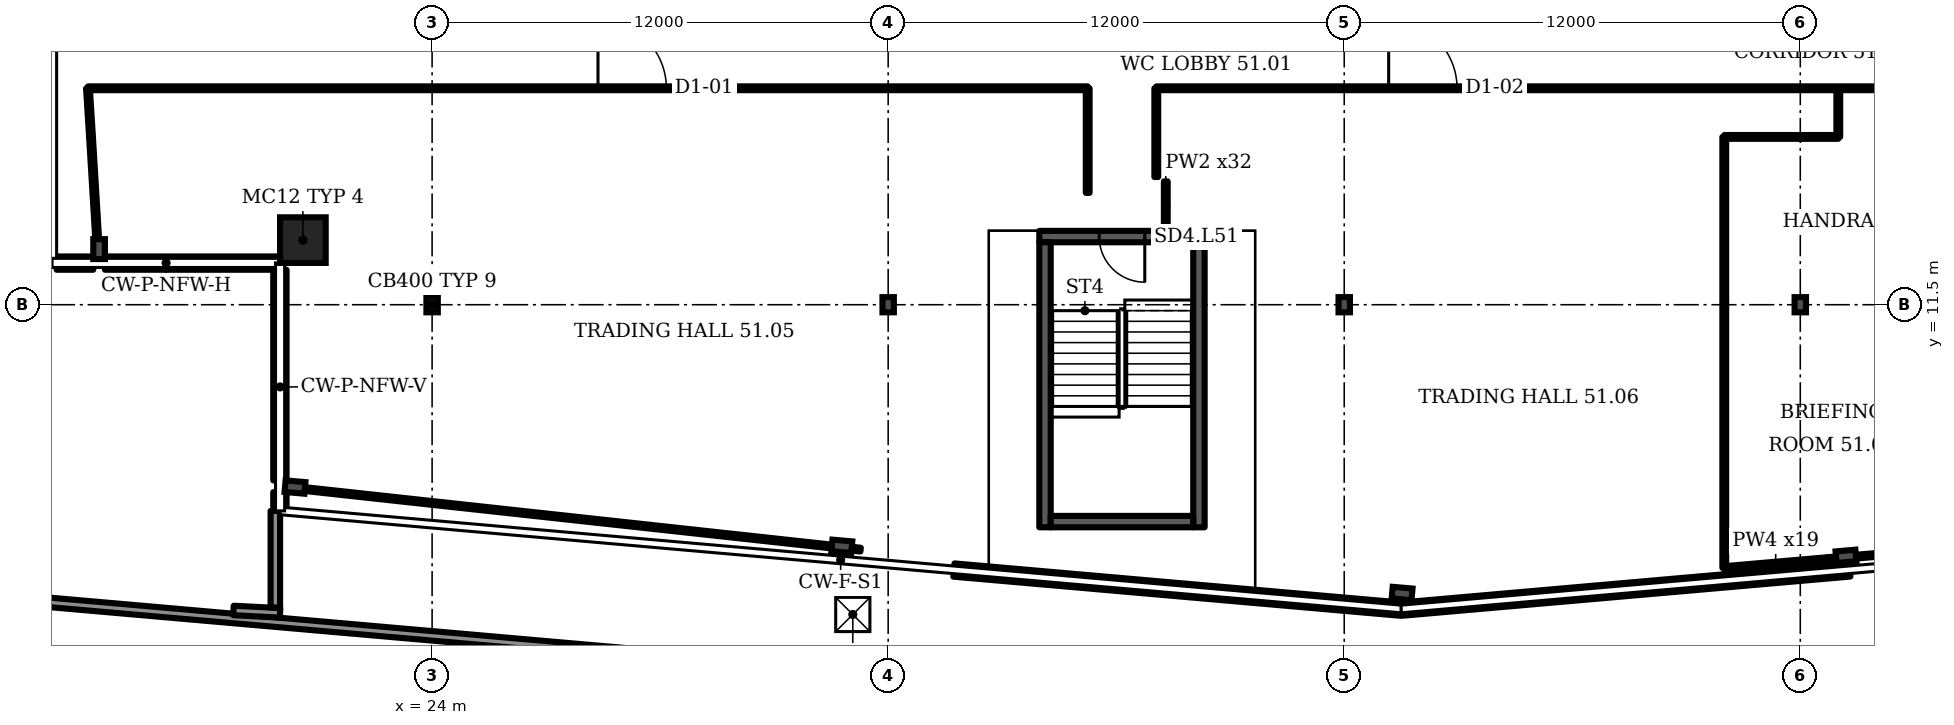
"""IFC4 building model, lengths in metres.
Left out: names, types, materials, properties, quantities, classifications, styles, units other than length and angle.
Written with IfcOpenShell. Run it as: python <this file> out.ifc"""

import sys

from ifc_helpers import new_model, si_unit, direction, frame, frame_2d, origin, origin_2d, place, context, subcontext, project, spatial, rectangle, i_section, extrude, element, fill, save


model = new_model("IFC4")
c1 = context("Model", 3, precision=1e-05, world=origin(), true_north=direction((0.0, 1.0)))
c2 = subcontext(c1, "Body", "Model", "MODEL_VIEW")
j1 = project(units=[si_unit("LENGTHUNIT", "METRE"), si_unit("PLANEANGLEUNIT", "RADIAN")], contexts=[c1])
p1 = place(None, origin())
s1 = spatial("IfcSite", under=j1, at=p1, CompositionType="ELEMENT")
p2 = place(p1, origin())
s2 = spatial("IfcBuilding", under=s1, at=p2, CompositionType="ELEMENT")
p3 = place(p2, frame((0.0, 0.0, 207.1)))
s3 = spatial("IfcBuildingStorey", under=s2, at=p3, CompositionType="ELEMENT", Elevation=207.1)
p4 = place(p3, frame((20.6, 13.2, 0.0), z_axis=(0.0, 0.0, 1.0), x_axis=(1.0, 0.0, 0.0)))
e1 = element("IfcColumn", 1, at=p4, inside=s3, PredefinedType="COLUMN", context=c2, shape_type="SweptSolid", body=[
    extrude(rectangle(XDim=1.2, YDim=1.2, at=origin_2d()), origin(), (0.0, 0.0, 1.0), 3.6),
])
for number, where, z_axis, x_axis in (
    (2, (20.392, 6.703, 0.0), (0.0, 0.0, 1.0), (-0.087, -0.996, 0.0)),
    (3, (34.781, 5.143, 0.0), (0.0, 0.0, 1.0), (-0.087, -0.996, 0.0)),
    (4, (49.523, 3.902, 0.0), (0.0, 0.0, 1.0), (-0.087, -0.996, 0.0)),
    (5, (61.202, 4.879, 0.0), (0.0, 0.0, 1.0), (0.087, -0.996, 0.0)),
    (6, (15.238, 12.963, 0.0), (0.0, 0.0, 1.0), (-1.0, 0.0, 0.0)),
):
    element("IfcColumn", number, at=place(p3, frame(where, z_axis=z_axis, x_axis=x_axis)), inside=s3, PredefinedType="COLUMN", context=c2, shape_type="SweptSolid", body=[
        extrude(i_section(OverallWidth=0.306, OverallDepth=0.524, WebThickness=0.021, FlangeThickness=0.04, FilletRadius=0.027, at=origin_2d()), origin(), (0.0, 0.0, 1.0), 3.6),
    ])
for number, where, z_axis, x_axis in (
    (7, (24.0, 11.5, 0.0), (0.0, 0.0, 1.0), (1.0, 0.0, 0.0)),
    (8, (36.0, 11.5, 0.0), (0.0, 0.0, 1.0), (1.0, 0.0, 0.0)),
    (9, (48.0, 11.5, 0.0), (0.0, 0.0, 1.0), (1.0, 0.0, 0.0)),
    (10, (60.0, 11.5, 0.0), (0.0, 0.0, 1.0), (1.0, 0.0, 0.0)),
):
    element("IfcColumn", number, at=place(p3, frame(where, z_axis=z_axis, x_axis=x_axis)), inside=s3, PredefinedType="COLUMN", context=c2, shape_type="SweptSolid", body=[
        extrude(i_section(OverallWidth=0.3, OverallDepth=0.4, WebThickness=0.013, FlangeThickness=0.024, FilletRadius=0.027, at=origin_2d()), origin(), (0.0, 0.0, 1.0), 3.6),
    ])
p5 = place(p3, frame((85.056, 4.28, 0.0), z_axis=(0.0, 0.0, 1.0), x_axis=(-0.996197, -0.087157, 0.0)))
e11 = element("IfcWall", 11, at=p5, inside=s3, PredefinedType="PARAPET", context=c2, shape_type="SweptSolid", body=[
    extrude(rectangle(XDim=39.205, YDim=0.25, at=frame_2d((19.603, 0.0))), origin(), (0.0, 0.0, 1.0), 1.1),
])
p6 = place(p3, frame((45.97, 0.865, 0.0), z_axis=(0.0, 0.0, 1.0), x_axis=(-0.996194, 0.087159, 0.0)))
e12 = element("IfcWall", 12, at=p6, inside=s3, PredefinedType="PARAPET", context=c2, shape_type="SweptSolid", body=[
    extrude(rectangle(XDim=33.232, YDim=0.25, at=frame_2d((16.616, 0.0))), origin(), (0.0, 0.0, 1.0), 1.1),
])
p7 = place(p3, frame((18.773, 3.455, 0.0), z_axis=(0.0, 0.0, 1.0), x_axis=(0.998698, -0.051088, 0.0)))
e13 = element("IfcWall", 13, at=p7, inside=s3, PredefinedType="PARAPET", context=c2, shape_type="SweptSolid", body=[
    extrude(rectangle(XDim=1.228, YDim=0.25, at=frame_2d((0.614, 0.0))), origin(), (0.0, 0.0, 1.0), 1.1),
])
p8 = place(p3, frame((19.875, 3.534, 0.0), z_axis=(0.0, 0.0, 1.0), x_axis=(0.0, 1.0, 0.0)))
e14 = element("IfcWall", 14, at=p8, inside=s3, PredefinedType="PARAPET", context=c2, shape_type="SweptSolid", body=[
    extrude(rectangle(XDim=2.541, YDim=0.25, at=frame_2d((1.271, 0.0))), origin(), (0.0, 0.0, 1.0), 1.1),
])
p9 = place(p3, frame((37.729, 4.519, 0.0), z_axis=(0.0, 0.0, 1.0), x_axis=(0.99619, -0.087167, 0.0)))
e15 = element("IfcWall", 15, at=p9, inside=s3, PredefinedType="SOLIDWALL", context=c2, shape_type="SweptSolid", body=[
    extrude(rectangle(XDim=11.831, YDim=0.35, at=frame_2d((5.915, 0.0))), origin(), (0.0, 0.0, 1.0), 1.0),
])
p10 = place(p3, frame((49.545, 3.493, 0.0), z_axis=(0.0, 0.0, 1.0), x_axis=(0.996196, 0.087141, 0.0)))
e16 = element("IfcWall", 16, at=p10, inside=s3, PredefinedType="SOLIDWALL", context=c2, shape_type="SweptSolid", body=[
    extrude(rectangle(XDim=11.803, YDim=0.35, at=frame_2d((5.902, 0.0))), origin(), (0.0, 0.0, 1.0), 1.0),
])
p11 = place(p3, frame((14.12, 12.595, 0.0), z_axis=(0.0, 0.0, 1.0), x_axis=(1.0, 0.0, 0.0)))
e17 = element("IfcWall", 17, at=p11, inside=s3, PredefinedType="SOLIDWALL", context=c2, shape_type="SweptSolid", body=[
    extrude(rectangle(XDim=0.965, YDim=0.35, at=frame_2d((0.482, 0.0))), origin(), (0.0, 0.0, 1.0), 1.0),
])
p12 = place(p3, frame((15.391, 12.595, 0.0), z_axis=(0.0, 0.0, 1.0), x_axis=(1.0, 0.0, 0.0)))
e18 = element("IfcWall", 18, at=p12, inside=s3, PredefinedType="SOLIDWALL", context=c2, shape_type="SweptSolid", body=[
    extrude(rectangle(XDim=4.609, YDim=0.35, at=frame_2d((2.305, 0.0))), origin(), (0.0, 0.0, 1.0), 1.0),
])
p13 = place(p3, frame((19.995, 12.42, 0.0), z_axis=(0.0, 0.0, 1.0), x_axis=(0.0, -1.0, 0.0)))
e19 = element("IfcWall", 19, at=p13, inside=s3, PredefinedType="SOLIDWALL", context=c2, shape_type="SweptSolid", body=[
    extrude(rectangle(XDim=5.542, YDim=0.35, at=frame_2d((2.771, 0.0))), origin(), (0.0, 0.0, 1.0), 1.0),
])
p14 = place(p3, frame((19.995, 6.568, 0.0), z_axis=(0.0, 0.0, 1.0), x_axis=(0.0, -1.0, 0.0)))
e20 = element("IfcWall", 20, at=p14, inside=s3, PredefinedType="SOLIDWALL", context=c2, shape_type="SweptSolid", body=[
    extrude(rectangle(XDim=0.394, YDim=0.35, at=frame_2d((0.197, 0.0))), origin(), (0.0, 0.0, 1.0), 1.0),
])
p15 = place(p3, frame((39.977, 13.293, 0.0), z_axis=(0.0, 0.0, 1.0), x_axis=(1.0, 0.0, 0.0)))
e21 = element("IfcWall", 21, at=p15, inside=s3, PredefinedType="SHEAR", context=c2, shape_type="SweptSolid", body=[
    extrude(rectangle(XDim=4.35, YDim=0.3, at=frame_2d((2.175, 0.0))), origin(), (0.0, 0.0, 1.0), 3.2),
])
p16 = place(p15, frame((1.575, 0.0, 0.0)))
e22 = element("IfcOpeningElement", 22, at=p16, cuts=e21, PredefinedType="OPENING", context=c2, shape_type="SweptSolid", body=[
    extrude(rectangle(XDim=1.2, YDim=2.1, at=frame_2d((0.6, 1.05))), frame((0.0, 0.16, 0.0), z_axis=(0.0, -1.0, 0.0), x_axis=(1.0, 0.0, 0.0)), (0.0, 0.0, 1.0), 0.32),
])
p17 = place(p3, frame((14.945, 17.195, 0.0), z_axis=(0.0, 0.0, 1.0), x_axis=(1.0, 0.0, 0.0)))
e23 = element("IfcWall", 23, at=p17, inside=s3, PredefinedType="PARTITIONING", context=c2, shape_type="SweptSolid", body=[
    extrude(rectangle(XDim=26.305, YDim=0.1, at=frame_2d((13.152, 0.0))), origin(), (0.0, 0.0, 1.0), 3.2),
])
p18 = place(p17, frame((13.42, 0.0, 0.0)))
e24 = element("IfcOpeningElement", 24, at=p18, cuts=e23, PredefinedType="OPENING", context=c2, shape_type="SweptSolid", body=[
    extrude(rectangle(XDim=1.8, YDim=2.1, at=frame_2d((0.9, 1.05))), frame((0.0, 0.06, 0.0), z_axis=(0.0, -1.0, 0.0), x_axis=(1.0, 0.0, 0.0)), (0.0, 0.0, 1.0), 0.12),
])
p19 = place(p3, frame((15.025, 15.915, 0.0), z_axis=(0.0, 0.0, 1.0), x_axis=(-0.062248, 0.998062, 0.0)))
e25 = element("IfcWall", 25, at=p19, inside=s3, PredefinedType="PARTITIONING", context=c2, shape_type="SweptSolid", body=[
    extrude(rectangle(XDim=1.282, YDim=0.1, at=frame_2d((0.641, 0.0))), origin(), (0.0, 0.0, 1.0), 2.58),
])
p20 = place(p3, frame((15.224, 12.62, 0.0), z_axis=(0.0, 0.0, 1.0), x_axis=(-0.060278, 0.998178, 0.0)))
e26 = element("IfcWall", 26, at=p20, inside=s3, PredefinedType="PARTITIONING", context=c2, shape_type="SweptSolid", body=[
    extrude(rectangle(XDim=3.301, YDim=0.1, at=frame_2d((1.65, 0.0))), origin(), (0.0, 0.0, 1.0), 2.58),
])
p21 = place(p3, frame((35.275, 5.055, 0.0), z_axis=(0.0, 0.0, 1.0), x_axis=(-0.994114, 0.108368, 0.0)))
e27 = element("IfcWall", 27, at=p21, inside=s3, PredefinedType="PARTITIONING", context=c2, shape_type="SweptSolid", body=[
    extrude(rectangle(XDim=15.335, YDim=0.1, at=frame_2d((7.668, 0.0))), origin(), (0.0, 0.0, 1.0), 2.58),
])
p22 = place(p3, frame((41.25, 14.443, 0.0), z_axis=(0.0, 0.0, 1.0), x_axis=(0.0, 1.0, 0.0)))
e28 = element("IfcWall", 28, at=p22, inside=s3, PredefinedType="PARTITIONING", context=c2, shape_type="SweptSolid", body=[
    extrude(rectangle(XDim=2.752, YDim=0.1, at=frame_2d((1.376, 0.0))), origin(), (0.0, 0.0, 1.0), 3.2),
])
p23 = place(p3, frame((43.055, 14.86, 0.0), z_axis=(0.0, 0.0, 1.0), x_axis=(0.0, 1.0, 0.0)))
e29 = element("IfcWall", 29, at=p23, inside=s3, PredefinedType="PARTITIONING", context=c2, shape_type="SweptSolid", body=[
    extrude(rectangle(XDim=2.335, YDim=0.1, at=frame_2d((1.167, 0.0))), origin(), (0.0, 0.0, 1.0), 3.2),
])
p24 = place(p3, frame((43.055, 17.195, 0.0), z_axis=(0.0, 0.0, 1.0), x_axis=(1.0, 0.0, 0.0)))
e30 = element("IfcWall", 30, at=p24, inside=s3, PredefinedType="PARTITIONING", context=c2, shape_type="SweptSolid", body=[
    extrude(rectangle(XDim=21.815, YDim=0.1, at=frame_2d((10.908, 0.0))), origin(), (0.0, 0.0, 1.0), 3.2),
])
p25 = place(p24, frame((6.115, 0.0, 0.0)))
e31 = element("IfcOpeningElement", 31, at=p25, cuts=e30, PredefinedType="OPENING", context=c2, shape_type="SweptSolid", body=[
    extrude(rectangle(XDim=1.8, YDim=2.1, at=frame_2d((0.9, 1.05))), frame((0.0, 0.06, 0.0), z_axis=(0.0, -1.0, 0.0), x_axis=(1.0, 0.0, 0.0)), (0.0, 0.0, 1.0), 0.12),
])
p26 = place(p24, frame((20.565, 0.0, 0.0)))
e32 = element("IfcOpeningElement", 32, at=p26, cuts=e30, PredefinedType="OPENING", context=c2, shape_type="SweptSolid", body=[
    extrude(rectangle(XDim=1.0, YDim=2.1, at=frame_2d((0.5, 1.05))), frame((0.0, 0.06, 0.0), z_axis=(0.0, -1.0, 0.0), x_axis=(1.0, 0.0, 0.0)), (0.0, 0.0, 1.0), 0.12),
])
p27 = place(p3, frame((43.305, 13.463, 0.0), z_axis=(0.0, 0.0, 1.0), x_axis=(0.0, 1.0, 0.0)))
e33 = element("IfcWall", 33, at=p27, inside=s3, PredefinedType="PARTITIONING", context=c2, shape_type="SweptSolid", body=[
    extrude(rectangle(XDim=1.282, YDim=0.1, at=frame_2d((0.641, 0.0))), origin(), (0.0, 0.0, 1.0), 3.2),
])
p28 = place(p3, frame((58.0, 4.57, 0.0), z_axis=(0.0, 0.0, 1.0), x_axis=(0.996256, 0.086498, 0.0)))
e34 = element("IfcWall", 34, at=p28, inside=s3, PredefinedType="PARTITIONING", context=c2, shape_type="SweptSolid", body=[
    extrude(rectangle(XDim=2.715, YDim=0.1, at=frame_2d((1.358, 0.0))), origin(), (0.0, 0.0, 1.0), 2.58),
])
p29 = place(p3, frame((58.0, 4.575, 0.0), z_axis=(0.0, 0.0, 1.0), x_axis=(0.0, 1.0, 0.0)))
e35 = element("IfcWall", 35, at=p29, inside=s3, PredefinedType="PARTITIONING", context=c2, shape_type="SweptSolid", body=[
    extrude(rectangle(XDim=11.34, YDim=0.1, at=frame_2d((5.67, 0.0))), origin(), (0.0, 0.0, 1.0), 3.2),
])
p30 = place(p3, frame((58.0, 15.915, 0.0), z_axis=(0.0, 0.0, 1.0), x_axis=(1.0, 0.0, 0.0)))
e36 = element("IfcWall", 36, at=p30, inside=s3, PredefinedType="PARTITIONING", context=c2, shape_type="SweptSolid", body=[
    extrude(rectangle(XDim=3.0, YDim=0.1, at=frame_2d((1.5, 0.0))), origin(), (0.0, 0.0, 1.0), 3.2),
])
p31 = place(p3, frame((60.705, 4.805, 0.0), z_axis=(0.0, 0.0, 1.0), x_axis=(0.996324, 0.085692, 0.0)))
e37 = element("IfcWall", 37, at=p31, inside=s3, PredefinedType="PARTITIONING", context=c2, shape_type="SweptSolid", body=[
    extrude(rectangle(XDim=2.955, YDim=0.1, at=frame_2d((1.477, 0.0))), origin(), (0.0, 0.0, 1.0), 2.58),
])
p32 = place(p3, frame((60.733, 4.497, 0.0), z_axis=(0.0, 0.0, 1.0), x_axis=(-0.090037, 0.995936, 0.0)))
e38 = element("IfcWall", 38, at=p32, inside=s3, PredefinedType="PARTITIONING", context=c2, shape_type="SweptSolid", body=[
    extrude(rectangle(XDim=0.309, YDim=0.1, at=frame_2d((0.155, 0.0))), origin(), (0.0, 0.0, 1.0), 3.2),
])
p33 = place(p3, frame((61.0, 15.915, 0.0), z_axis=(0.0, 0.0, 1.0), x_axis=(0.0, 1.0, 0.0)))
e39 = element("IfcWall", 39, at=p33, inside=s3, PredefinedType="PARTITIONING", context=c2, shape_type="SweptSolid", body=[
    extrude(rectangle(XDim=1.28, YDim=0.1, at=frame_2d((0.64, 0.0))), origin(), (0.0, 0.0, 1.0), 3.2),
])
for number, where, z_axis, x_axis in (
    (40, (40.127, 5.643, 0.0), (0.0, 0.0, 1.0), (0.0, 1.0, 0.0)),
    (41, (44.177, 5.643, 0.0), (0.0, 0.0, 1.0), (0.0, 1.0, 0.0)),
):
    element("IfcWall", number, at=place(p3, frame(where, z_axis=z_axis, x_axis=x_axis)), inside=s3, PredefinedType="SHEAR", context=c2, shape_type="SweptSolid", body=[
        extrude(rectangle(XDim=7.5, YDim=0.3, at=frame_2d((3.75, 0.0))), origin(), (0.0, 0.0, 1.0), 3.2),
    ])
p34 = place(p3, frame((40.277, 5.793, 0.0), z_axis=(0.0, 0.0, 1.0), x_axis=(1.0, 0.0, 0.0)))
e42 = element("IfcWall", 42, at=p34, inside=s3, PredefinedType="SHEAR", context=c2, shape_type="SweptSolid", body=[
    extrude(rectangle(XDim=3.75, YDim=0.3, at=frame_2d((1.875, 0.0))), origin(), (0.0, 0.0, 1.0), 3.2),
])
p35 = place(p3, frame((0.0, 0.0, -0.4)))
p36 = place(p35, frame((35.07, 3.349, 0.0)))
p37 = place(p36, frame((0.0, 0.0, 0.36)))
e43 = element("IfcDoor", 43, at=p37, inside=s3, OperationType="SINGLE_SWING_LEFT", PredefinedType="TRAPDOOR", context=c2, shape_type="SweptSolid", body=[
    extrude(rectangle(XDim=0.9, YDim=0.9, at=origin_2d()), origin(), (0.0, 0.0, 1.0), 0.05),
])
p38 = place(p16, origin())
e44 = element("IfcDoor", 44, at=p38, inside=s3, OperationType="SINGLE_SWING_RIGHT", PredefinedType="DOOR", context=c2, shape_type="SweptSolid", body=[
    extrude(rectangle(XDim=1.2, YDim=2.1, at=frame_2d((0.6, 1.05))), frame((0.0, 0.025, 0.0), z_axis=(0.0, -1.0, 0.0), x_axis=(1.0, 0.0, 0.0)), (0.0, 0.0, 1.0), 0.05),
])
fill(e22, e44)
p39 = place(p18, origin())
e45 = element("IfcDoor", 45, at=p39, inside=s3, OperationType="DOUBLE_DOOR_SINGLE_SWING", PredefinedType="DOOR", context=c2, shape_type="SweptSolid", body=[
    extrude(rectangle(XDim=1.8, YDim=2.1, at=frame_2d((0.9, 1.05))), frame((0.0, 0.025, 0.0), z_axis=(0.0, -1.0, 0.0), x_axis=(1.0, 0.0, 0.0)), (0.0, 0.0, 1.0), 0.05),
])
fill(e24, e45)
p40 = place(p25, origin())
e46 = element("IfcDoor", 46, at=p40, inside=s3, OperationType="DOUBLE_DOOR_SINGLE_SWING", PredefinedType="DOOR", context=c2, shape_type="SweptSolid", body=[
    extrude(rectangle(XDim=1.8, YDim=2.1, at=frame_2d((0.9, 1.05))), frame((0.0, 0.025, 0.0), z_axis=(0.0, -1.0, 0.0), x_axis=(1.0, 0.0, 0.0)), (0.0, 0.0, 1.0), 0.05),
])
fill(e31, e46)
save(model, sys.argv[1])
